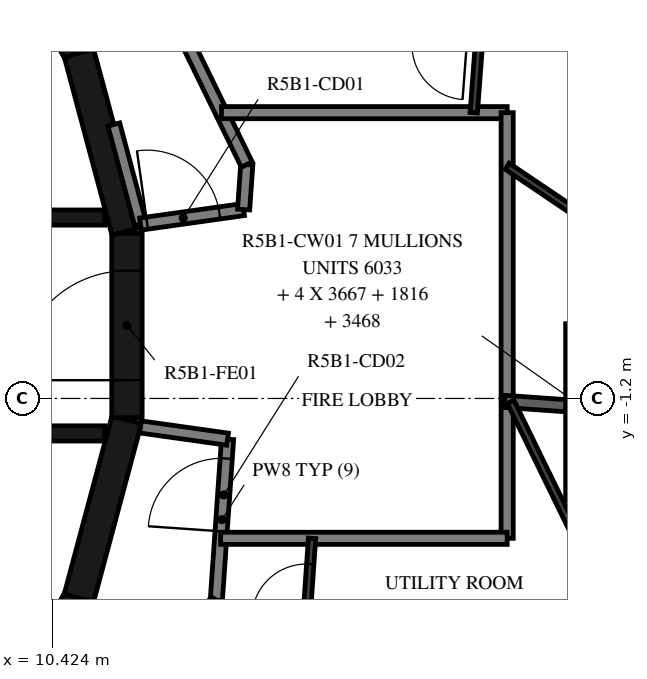
"""IFC4 building model, lengths in metres.
Left out: names, types, materials, properties, quantities, classifications, styles, units other than length and angle.
Written with IfcOpenShell. Run it as: python <this file> out.ifc"""

import sys

from ifc_helpers import new_model, si_unit, direction, frame, frame_2d, origin, place, context, subcontext, project, spatial, polyline, rectangle, outline, extrude, element, fill, save


model = new_model("IFC4")
c1 = context("Model", 3, precision=1e-05, world=origin(), true_north=direction((0.0, 1.0)))
c2 = subcontext(c1, "Body", "Model", "MODEL_VIEW")
j1 = project(units=[si_unit("LENGTHUNIT", "METRE"), si_unit("PLANEANGLEUNIT", "RADIAN")], contexts=[c1])
p1 = place(None, origin())
s1 = spatial("IfcSite", under=j1, at=p1, CompositionType="ELEMENT")
p2 = place(p1, origin())
s2 = spatial("IfcBuilding", under=s1, at=p2, CompositionType="ELEMENT")
p3 = place(p2, frame((0.0, 0.0, 198.9)))
s3 = spatial("IfcBuildingStorey", under=s2, at=p3, CompositionType="ELEMENT", Elevation=198.9)
for number, where, z_axis, x_axis in (
    (1, (9.329, -7.137, 0.0), (0.0, 0.0, 1.0), (0.5, 0.866, 0.0)),
    (2, (10.858, -4.479, 0.0), (0.0, 0.0, 1.0), (0.259, 0.966, 0.0)),
):
    element("IfcWall", number, at=place(p3, frame(where, z_axis=z_axis, x_axis=x_axis)), inside=s3, PredefinedType="SHEAR", context=c2, shape_type="SweptSolid", body=[
        extrude(rectangle(XDim=3.033, YDim=0.5, at=frame_2d((1.516, 0.0))), origin(), (0.0, 0.0, 1.0), 3.12),
    ])
p4 = place(p3, frame((11.647, -1.516, 0.0), z_axis=(0.0, 0.0, 1.0), x_axis=(0.0, 1.0, 0.0)))
e3 = element("IfcWall", 3, at=p4, inside=s3, PredefinedType="SHEAR", context=c2, shape_type="SweptSolid", body=[
    extrude(rectangle(XDim=3.033, YDim=0.5, at=frame_2d((1.516, 0.0))), origin(), (0.0, 0.0, 1.0), 3.12),
])
p5 = place(p4, frame((0.616, 0.0, 0.0)))
e4 = element("IfcOpeningElement", 4, at=p5, cuts=e3, PredefinedType="OPENING", context=c2, shape_type="SweptSolid", body=[
    extrude(rectangle(XDim=1.8, YDim=2.1, at=frame_2d((0.9, 1.05))), frame((0.0, 0.26, 0.0), z_axis=(0.0, -1.0, 0.0), x_axis=(1.0, 0.0, 0.0)), (0.0, 0.0, 1.0), 0.52),
])
for number, where, z_axis, x_axis in (
    (5, (11.643, 1.55, 0.0), (0.0, 0.0, 1.0), (-0.259, 0.966, 0.0)),
    (6, (10.845, 4.51, 0.0), (0.0, 0.0, 1.0), (-0.5, 0.866, 0.0)),
):
    element("IfcWall", number, at=place(p3, frame(where, z_axis=z_axis, x_axis=x_axis)), inside=s3, PredefinedType="SHEAR", context=c2, shape_type="SweptSolid", body=[
        extrude(rectangle(XDim=3.033, YDim=0.5, at=frame_2d((1.516, 0.0))), origin(), (0.0, 0.0, 1.0), 3.12),
    ])
p6 = place(p3, frame((3.35, 1.775, 0.0), z_axis=(0.0, 0.0, 1.0), x_axis=(1.0, 0.0, 0.0)))
e7 = element("IfcWall", 7, at=p6, inside=s3, PredefinedType="SHEAR", context=c2, shape_type="SweptSolid", body=[
    extrude(rectangle(XDim=7.93, YDim=0.25, at=frame_2d((3.965, 0.0))), origin(), (0.0, 0.0, 1.0), 3.12),
])
p7 = place(p6, frame((0.35, 0.0, 0.0)))
e8 = element("IfcOpeningElement", 8, at=p7, cuts=e7, PredefinedType="OPENING", context=c2, shape_type="SweptSolid", body=[
    extrude(rectangle(XDim=1.2, YDim=2.4, at=frame_2d((0.6, 1.2))), frame((0.0, 0.135, 0.0), z_axis=(0.0, -1.0, 0.0), x_axis=(1.0, 0.0, 0.0)), (0.0, 0.0, 1.0), 0.27),
])
p8 = place(p6, frame((2.5, 0.0, 0.0)))
e9 = element("IfcOpeningElement", 9, at=p8, cuts=e7, PredefinedType="OPENING", context=c2, shape_type="SweptSolid", body=[
    extrude(rectangle(XDim=1.2, YDim=2.4, at=frame_2d((0.6, 1.2))), frame((0.0, 0.135, 0.0), z_axis=(0.0, -1.0, 0.0), x_axis=(1.0, 0.0, 0.0)), (0.0, 0.0, 1.0), 0.27),
])
p9 = place(p6, frame((4.8, 0.0, 0.0)))
e10 = element("IfcOpeningElement", 10, at=p9, cuts=e7, PredefinedType="OPENING", context=c2, shape_type="SweptSolid", body=[
    extrude(rectangle(XDim=0.9, YDim=2.1, at=frame_2d((0.45, 1.05))), frame((0.0, 0.135, 0.0), z_axis=(0.0, -1.0, 0.0), x_axis=(1.0, 0.0, 0.0)), (0.0, 0.0, 1.0), 0.27),
])
p10 = place(p3, frame((3.35, -1.775, 0.0), z_axis=(0.0, 0.0, 1.0), x_axis=(1.0, 0.0, 0.0)))
e11 = element("IfcWall", 11, at=p10, inside=s3, PredefinedType="SHEAR", context=c2, shape_type="SweptSolid", body=[
    extrude(rectangle(XDim=7.93, YDim=0.25, at=frame_2d((3.965, 0.0))), origin(), (0.0, 0.0, 1.0), 3.12),
])
p11 = place(p10, frame((0.4, 0.0, 0.0)))
e12 = element("IfcOpeningElement", 12, at=p11, cuts=e11, PredefinedType="OPENING", context=c2, shape_type="SweptSolid", body=[
    extrude(rectangle(XDim=1.1, YDim=2.4, at=frame_2d((0.55, 1.2))), frame((0.0, 0.135, 0.0), z_axis=(0.0, -1.0, 0.0), x_axis=(1.0, 0.0, 0.0)), (0.0, 0.0, 1.0), 0.27),
])
p12 = place(p10, frame((2.55, 0.0, 0.0)))
e13 = element("IfcOpeningElement", 13, at=p12, cuts=e11, PredefinedType="OPENING", context=c2, shape_type="SweptSolid", body=[
    extrude(rectangle(XDim=1.1, YDim=2.4, at=frame_2d((0.55, 1.2))), frame((0.0, 0.135, 0.0), z_axis=(0.0, -1.0, 0.0), x_axis=(1.0, 0.0, 0.0)), (0.0, 0.0, 1.0), 0.27),
])
p13 = place(p10, frame((4.7, 0.0, 0.0)))
e14 = element("IfcOpeningElement", 14, at=p13, cuts=e11, PredefinedType="OPENING", context=c2, shape_type="SweptSolid", body=[
    extrude(rectangle(XDim=1.1, YDim=2.4, at=frame_2d((0.55, 1.2))), frame((0.0, 0.135, 0.0), z_axis=(0.0, -1.0, 0.0), x_axis=(1.0, 0.0, 0.0)), (0.0, 0.0, 1.0), 0.27),
])
p14 = place(p3, frame((11.87, 1.668, 0.0), z_axis=(0.0, 0.0, 1.0), x_axis=(-0.258836880648, 0.965921047093, 0.0)))
e15 = element("IfcWall", 15, at=p14, inside=s3, PredefinedType="STANDARD", context=c2, shape_type="SweptSolid", body=[
    extrude(rectangle(XDim=1.695, YDim=0.2, at=frame_2d((0.848, 0.0))), origin(), (0.0, 0.0, 1.0), 3.12),
])
p15 = place(p3, frame((11.87, 1.668, 0.0), z_axis=(0.0, 0.0, 1.0), x_axis=(0.990271931984, 0.139145609792, 0.0)))
e16 = element("IfcWall", 16, at=p15, inside=s3, PredefinedType="STANDARD", context=c2, shape_type="SweptSolid", body=[
    extrude(rectangle(XDim=1.712, YDim=0.2, at=frame_2d((0.856, 0.0))), origin(), (0.0, 0.0, 1.0), 3.12),
])
p16 = place(p15, frame((0.11, 0.0, 0.0)))
e17 = element("IfcOpeningElement", 17, at=p16, cuts=e16, PredefinedType="OPENING", context=c2, shape_type="SweptSolid", body=[
    extrude(rectangle(XDim=1.2, YDim=2.1, at=frame_2d((0.6, 1.05))), frame((0.0, 0.11, 0.0), z_axis=(0.0, -1.0, 0.0), x_axis=(1.0, 0.0, 0.0)), (0.0, 0.0, 1.0), 0.22),
])
p17 = place(p3, frame((13.566, 1.906, 0.0), z_axis=(0.0, 0.0, 1.0), x_axis=(0.07005495793, 0.997543133338, 0.0)))
e18 = element("IfcWall", 18, at=p17, inside=s3, PredefinedType="STANDARD", context=c2, shape_type="SweptSolid", body=[
    extrude(rectangle(XDim=0.742, YDim=0.2, at=frame_2d((0.371, 0.0))), origin(), (0.0, 0.0, 1.0), 3.12),
])
p18 = place(p3, frame((13.618, 2.647, 0.0), z_axis=(0.0, 0.0, 1.0), x_axis=(-0.438366026218, 0.898796543751, 0.0)))
e19 = element("IfcWall", 19, at=p18, inside=s3, PredefinedType="STANDARD", context=c2, shape_type="SweptSolid", body=[
    extrude(rectangle(XDim=7.181, YDim=0.2, at=frame_2d((3.591, 0.0))), origin(), (0.0, 0.0, 1.0), 3.12),
])
p19 = place(p3, frame((13.117, -4.517, 0.0), z_axis=(0.0, 0.0, 1.0), x_axis=(0.069736659613, 0.997565435601, 0.0)))
e20 = element("IfcWall", 20, at=p19, inside=s3, PredefinedType="STANDARD", context=c2, shape_type="SweptSolid", body=[
    extrude(rectangle(XDim=2.654, YDim=0.2, at=frame_2d((1.327, 0.0))), origin(), (0.0, 0.0, 1.0), 3.12),
])
p20 = place(p19, frame((1.134, 0.0, 0.0)))
e21 = element("IfcOpeningElement", 21, at=p20, cuts=e20, PredefinedType="OPENING", context=c2, shape_type="SweptSolid", body=[
    extrude(rectangle(XDim=1.2, YDim=2.1, at=frame_2d((0.6, 1.05))), frame((0.0, 0.11, 0.0), z_axis=(0.0, -1.0, 0.0), x_axis=(1.0, 0.0, 0.0)), (0.0, 0.0, 1.0), 0.22),
])
p21 = place(p3, frame((13.302, -1.869, 0.0), z_axis=(0.0, 0.0, 1.0), x_axis=(-0.990274397042, 0.13912806533, 0.0)))
e22 = element("IfcWall", 22, at=p21, inside=s3, PredefinedType="STANDARD", context=c2, shape_type="SweptSolid", body=[
    extrude(rectangle(XDim=1.446, YDim=0.2, at=frame_2d((0.723, 0.0))), origin(), (0.0, 0.0, 1.0), 3.12),
])
p22 = place(p3, frame((9.101, -10.47, 0.0), z_axis=(0.0, 0.0, 1.0), x_axis=(0.559195469534, 0.829035841718, 0.0)))
e23 = element("IfcWall", 23, at=p22, inside=s3, PredefinedType="STANDARD", context=c2, shape_type="SweptSolid", body=[
    extrude(rectangle(XDim=7.181, YDim=0.2, at=frame_2d((3.591, 0.0))), origin(), (0.0, 0.0, 1.0), 3.12),
])
p23 = place(p3, frame((17.9, 3.5, 0.0), z_axis=(0.0, 0.0, 1.0), x_axis=(-1.0, 0.0, 0.0)))
e24 = element("IfcWall", 24, at=p23, inside=s3, PredefinedType="STANDARD", context=c2, shape_type="SweptSolid", body=[
    extrude(rectangle(XDim=4.698, YDim=0.2, at=frame_2d((2.349, 0.0))), origin(), (0.0, 0.0, 1.0), 3.12),
])
p24 = place(p3, frame((17.9, -3.5, 0.0), z_axis=(0.0, 0.0, 1.0), x_axis=(0.0, 1.0, 0.0)))
e25 = element("IfcWall", 25, at=p24, inside=s3, PredefinedType="STANDARD", context=c2, shape_type="SweptSolid", body=[
    extrude(rectangle(XDim=7.0, YDim=0.2, at=frame_2d((3.5, 0.0))), origin(), (0.0, 0.0, 1.0), 3.12),
])
p25 = place(p3, frame((13.188, -3.5, 0.0), z_axis=(0.0, 0.0, 1.0), x_axis=(1.0, 0.0, 0.0)))
e26 = element("IfcWall", 26, at=p25, inside=s3, PredefinedType="STANDARD", context=c2, shape_type="SweptSolid", body=[
    extrude(rectangle(XDim=4.712, YDim=0.2, at=frame_2d((2.356, 0.0))), origin(), (0.0, 0.0, 1.0), 3.12),
])
p26 = place(p3, frame((17.857, -1.249, 0.0), z_axis=(0.0, 0.0, 1.0), x_axis=(0.997556932604, -0.069858186453, 0.0)))
e27 = element("IfcWall", 27, at=p26, inside=s3, PredefinedType="STANDARD", context=c2, shape_type="SweptSolid", body=[
    extrude(rectangle(XDim=1.087, YDim=0.2, at=frame_2d((0.543, 0.0))), origin(), (0.0, 0.0, 1.0), 3.12),
])
p27 = place(p3, frame((17.351, 3.5, 0.0), z_axis=(0.0, 0.0, 1.0), x_axis=(0.075374124137, 0.997155324616, 0.0)))
e28 = element("IfcWall", 28, at=p27, inside=s3, PredefinedType="PARTITIONING", context=c2, shape_type="SweptSolid", body=[
    extrude(rectangle(XDim=1.101, YDim=0.12, at=frame_2d((0.551, 0.0))), origin(), (0.0, 0.0, 1.0), 3.12),
])
p28 = place(p3, frame((21.141, 0.433, 0.0), z_axis=(0.0, 0.0, 1.0), x_axis=(-0.829049908454, 0.559174614313, 0.0)))
e29 = element("IfcWall", 29, at=p28, inside=s3, PredefinedType="PARTITIONING", context=c2, shape_type="SweptSolid", body=[
    extrude(rectangle(XDim=3.909, YDim=0.12, at=frame_2d((1.955, 0.0))), origin(), (0.0, 0.0, 1.0), 3.12),
])
p29 = place(p28, frame((0.8, 0.0, 0.0)))
e30 = element("IfcOpeningElement", 30, at=p29, cuts=e29, PredefinedType="OPENING", context=c2, shape_type="SweptSolid", body=[
    extrude(rectangle(XDim=0.8, YDim=2.1, at=frame_2d((0.4, 1.05))), frame((0.0, 0.07, 0.0), z_axis=(0.0, -1.0, 0.0), x_axis=(1.0, 0.0, 0.0)), (0.0, 0.0, 1.0), 0.14),
])
p30 = place(p3, frame((14.585, -5.022, 0.0), z_axis=(0.0, 0.0, 1.0), x_axis=(0.069757481187, 0.997563979812, 0.0)))
e31 = element("IfcWall", 31, at=p30, inside=s3, PredefinedType="PARTITIONING", context=c2, shape_type="SweptSolid", body=[
    extrude(rectangle(XDim=1.526, YDim=0.12, at=frame_2d((0.763, 0.0))), origin(), (0.0, 0.0, 1.0), 3.12),
])
p31 = place(p30, frame((0.2, 0.0, 0.0)))
e32 = element("IfcOpeningElement", 32, at=p31, cuts=e31, PredefinedType="OPENING", context=c2, shape_type="SweptSolid", body=[
    extrude(rectangle(XDim=0.9, YDim=2.1, at=frame_2d((0.45, 1.05))), frame((0.0, 0.07, 0.0), z_axis=(0.0, -1.0, 0.0), x_axis=(1.0, 0.0, 0.0)), (0.0, 0.0, 1.0), 0.14),
])
p32 = place(p3, frame((20.403, -6.271, 0.0), z_axis=(0.0, 0.0, 1.0), x_axis=(-0.438371913736, 0.898793672234, 0.0)))
e33 = element("IfcWall", 33, at=p32, inside=s3, PredefinedType="PARTITIONING", context=c2, shape_type="SweptSolid", body=[
    extrude(rectangle(XDim=5.58, YDim=0.12, at=frame_2d((2.79, 0.0))), origin(), (0.0, 0.0, 1.0), 3.12),
])
p33 = place(p32, frame((0.2, 0.0, 0.0)))
e34 = element("IfcOpeningElement", 34, at=p33, cuts=e33, PredefinedType="OPENING", context=c2, shape_type="SweptSolid", body=[
    extrude(rectangle(XDim=0.9, YDim=2.1, at=frame_2d((0.45, 1.05))), frame((0.0, 0.07, 0.0), z_axis=(0.0, -1.0, 0.0), x_axis=(1.0, 0.0, 0.0)), (0.0, 0.0, 1.0), 0.14),
])
p34 = place(p3, origin())
e35 = element("IfcWall", 35, at=p34, inside=s3, PredefinedType="STANDARD", context=c2, shape_type="SweptSolid", body=[
    extrude(outline(polyline([(21.762, 0.03), (21.762, -2.87), (18.862, -2.87), (18.862, 0.03), (21.762, 0.03)]), holes=[polyline([(19.062, -2.67), (21.562, -2.67), (21.562, -0.17), (19.062, -0.17), (19.062, -2.67)])]), origin(), (0.0, 0.0, 1.0), 3.12),
])
p35 = place(p5, origin())
e36 = element("IfcDoor", 36, at=p35, inside=s3, OperationType="DOUBLE_DOOR_SINGLE_SWING", PredefinedType="DOOR", context=c2, shape_type="SweptSolid", body=[
    extrude(rectangle(XDim=1.8, YDim=2.1, at=frame_2d((0.9, 1.05))), frame((0.0, 0.025, 0.0), z_axis=(0.0, -1.0, 0.0), x_axis=(1.0, 0.0, 0.0)), (0.0, 0.0, 1.0), 0.05),
])
fill(e4, e36)
p36 = place(p31, origin())
e37 = element("IfcDoor", 37, at=p36, inside=s3, OperationType="SINGLE_SWING_RIGHT", PredefinedType="DOOR", context=c2, shape_type="SweptSolid", body=[
    extrude(rectangle(XDim=0.9, YDim=2.1, at=frame_2d((0.45, 1.05))), frame((0.0, 0.025, 0.0), z_axis=(0.0, -1.0, 0.0), x_axis=(1.0, 0.0, 0.0)), (0.0, 0.0, 1.0), 0.05),
])
fill(e32, e37)
p37 = place(p16, origin())
e38 = element("IfcDoor", 38, at=p37, inside=s3, OperationType="DOUBLE_DOOR_SINGLE_SWING", PredefinedType="DOOR", context=c2, shape_type="SweptSolid", body=[
    extrude(rectangle(XDim=1.2, YDim=2.1, at=frame_2d((0.6, 1.05))), frame((0.0, 0.025, 0.0), z_axis=(0.0, -1.0, 0.0), x_axis=(1.0, 0.0, 0.0)), (0.0, 0.0, 1.0), 0.05),
])
fill(e17, e38)
p38 = place(p20, origin())
e39 = element("IfcDoor", 39, at=p38, inside=s3, OperationType="DOUBLE_DOOR_SINGLE_SWING", PredefinedType="DOOR", context=c2, shape_type="SweptSolid", body=[
    extrude(rectangle(XDim=1.2, YDim=2.1, at=frame_2d((0.6, 1.05))), frame((0.0, 0.025, 0.0), z_axis=(0.0, -1.0, 0.0), x_axis=(1.0, 0.0, 0.0)), (0.0, 0.0, 1.0), 0.05),
])
fill(e21, e39)
save(model, sys.argv[1])
